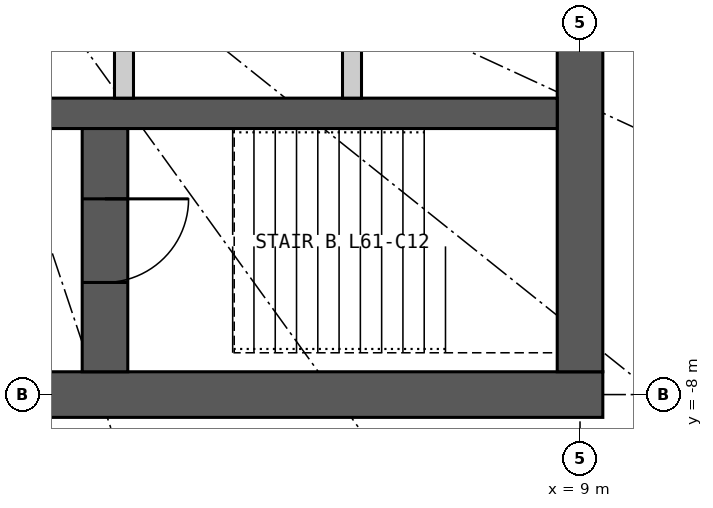
"""IFC4 building model, lengths in metres.
Left out: names, types, materials, properties, quantities, classifications, styles, units other than length and angle.
Written with IfcOpenShell. Run it as: python <this file> out.ifc"""

import sys

from ifc_helpers import new_model, si_unit, direction, frame, frame_2d, origin, place, context, subcontext, project, spatial, rectangle, extrude, element, fill, save


model = new_model("IFC4")
c1 = context("Model", 3, precision=1e-05, world=origin(), true_north=direction((0.0, 1.0)))
c2 = subcontext(c1, "Body", "Model", "MODEL_VIEW")
j1 = project(units=[si_unit("LENGTHUNIT", "METRE"), si_unit("PLANEANGLEUNIT", "RADIAN")], contexts=[c1])
p1 = place(None, origin())
s1 = spatial("IfcSite", under=j1, at=p1, CompositionType="ELEMENT")
p2 = place(p1, origin())
s2 = spatial("IfcBuilding", under=s1, at=p2, CompositionType="ELEMENT")
p3 = place(p2, frame((0.0, 0.0, 225.9)))
s3 = spatial("IfcBuildingStorey", under=s2, at=p3, CompositionType="ELEMENT", Elevation=225.9)
p4 = place(p3, frame((9.3, -8.0, 0.0), z_axis=(0.0, 0.0, 1.0), x_axis=(-1.0, 0.0, 0.0)))
e1 = element("IfcWall", 1, at=p4, inside=s3, PredefinedType="SHEAR", context=c2, shape_type="SweptSolid", body=[
    extrude(rectangle(XDim=18.6, YDim=0.6, at=frame_2d((9.3, 0.0))), origin(), (0.0, 0.0, 1.0), 3.3),
])
p5 = place(p4, frame((8.0, 0.0, 0.0)))
e2 = element("IfcOpeningElement", 2, at=p5, cuts=e1, PredefinedType="OPENING", context=c2, shape_type="SweptSolid", body=[
    extrude(rectangle(XDim=1.2, YDim=2.2, at=frame_2d((0.6, 1.1))), frame((0.0, 0.31, 0.0), z_axis=(0.0, -1.0, 0.0), x_axis=(1.0, 0.0, 0.0)), (0.0, 0.0, 1.0), 0.62),
])
p6 = place(p4, frame((15.6, 0.0, 0.0)))
e3 = element("IfcOpeningElement", 3, at=p6, cuts=e1, PredefinedType="OPENING", context=c2, shape_type="SweptSolid", body=[
    extrude(rectangle(XDim=0.9, YDim=2.2, at=frame_2d((0.45, 1.1))), frame((0.0, 0.31, 0.0), z_axis=(0.0, -1.0, 0.0), x_axis=(1.0, 0.0, 0.0)), (0.0, 0.0, 1.0), 0.62),
])
p7 = place(p3, frame((9.0, -7.7, 0.0), z_axis=(0.0, 0.0, 1.0), x_axis=(0.0, 1.0, 0.0)))
e4 = element("IfcWall", 4, at=p7, inside=s3, PredefinedType="SHEAR", context=c2, shape_type="SweptSolid", body=[
    extrude(rectangle(XDim=15.4, YDim=0.6, at=frame_2d((7.7, 0.0))), origin(), (0.0, 0.0, 1.0), 3.3),
])
p8 = place(p7, frame((6.8, 0.0, 0.0)))
e5 = element("IfcOpeningElement", 5, at=p8, cuts=e4, PredefinedType="OPENING", context=c2, shape_type="SweptSolid", body=[
    extrude(rectangle(XDim=1.8, YDim=2.2, at=frame_2d((0.9, 1.1))), frame((0.0, 0.31, 0.0), z_axis=(0.0, -1.0, 0.0), x_axis=(1.0, 0.0, 0.0)), (0.0, 0.0, 1.0), 0.62),
])
p9 = place(p3, frame((-8.7, -4.3, 0.0), z_axis=(0.0, 0.0, 1.0), x_axis=(1.0, 0.0, 0.0)))
e6 = element("IfcWall", 6, at=p9, inside=s3, PredefinedType="SHEAR", context=c2, shape_type="SweptSolid", body=[
    extrude(rectangle(XDim=17.4, YDim=0.4, at=frame_2d((8.7, 0.0))), origin(), (0.0, 0.0, 1.0), 3.3),
])
p10 = place(p3, frame((2.75, -7.7, 0.0), z_axis=(0.0, 0.0, 1.0), x_axis=(0.0, 1.0, 0.0)))
e7 = element("IfcWall", 7, at=p10, inside=s3, PredefinedType="SHEAR", context=c2, shape_type="SweptSolid", body=[
    extrude(rectangle(XDim=3.2, YDim=0.6, at=frame_2d((1.6, 0.0))), origin(), (0.0, 0.0, 1.0), 3.3),
])
p11 = place(p10, frame((1.175, 0.0, 0.0)))
e8 = element("IfcOpeningElement", 8, at=p11, cuts=e7, PredefinedType="OPENING", context=c2, shape_type="SweptSolid", body=[
    extrude(rectangle(XDim=1.1, YDim=2.2, at=frame_2d((0.55, 1.1))), frame((0.0, 0.31, 0.0), z_axis=(0.0, -1.0, 0.0), x_axis=(1.0, 0.0, 0.0)), (0.0, 0.0, 1.0), 0.62),
])
for number, where, z_axis, x_axis in (
    (9, (3.0, -4.1, 0.0), (0.0, 0.0, 1.0), (0.0, 1.0, 0.0)),
    (10, (6.0, -4.1, 0.0), (0.0, 0.0, 1.0), (0.0, 1.0, 0.0)),
):
    element("IfcWall", number, at=place(p3, frame(where, z_axis=z_axis, x_axis=x_axis)), inside=s3, PredefinedType="PARTITIONING", context=c2, shape_type="SweptSolid", body=[
        extrude(rectangle(XDim=2.35, YDim=0.25, at=frame_2d((1.175, 0.0))), origin(), (0.0, 0.0, 1.0), 3.3),
    ])
p12 = place(p11, origin())
e11 = element("IfcDoor", 11, at=p12, inside=s3, OperationType="SINGLE_SWING_RIGHT", PredefinedType="DOOR", context=c2, shape_type="SweptSolid", body=[
    extrude(rectangle(XDim=1.1, YDim=2.2, at=frame_2d((0.55, 1.1))), frame((0.0, 0.025, 0.0), z_axis=(0.0, -1.0, 0.0), x_axis=(1.0, 0.0, 0.0)), (0.0, 0.0, 1.0), 0.05),
])
fill(e8, e11)
save(model, sys.argv[1])
